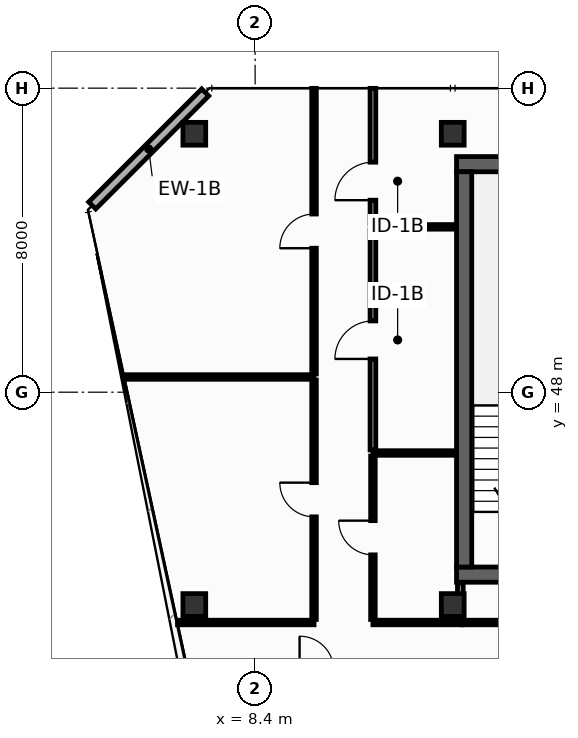
"""IFC4 building model, lengths in metres.
Left out: names, types, materials, properties, quantities, classifications, styles, units other than length and angle.
Written with IfcOpenShell. Run it as: python <this file> out.ifc"""

import sys

from ifc_helpers import new_model, si_unit, direction, frame, frame_2d, origin, origin_2d, place, context, subcontext, project, spatial, rectangle, hollow_rectangle, extrude, element, fill, save


model = new_model("IFC4")
c1 = context("Model", 3, precision=1e-05, world=origin(), true_north=direction((0.0, 1.0)))
c2 = subcontext(c1, "Body", "Model", "MODEL_VIEW")
j1 = project(units=[si_unit("LENGTHUNIT", "METRE"), si_unit("PLANEANGLEUNIT", "RADIAN")], contexts=[c1])
p1 = place(None, origin())
s1 = spatial("IfcSite", under=j1, at=p1, CompositionType="ELEMENT")
p2 = place(p1, origin())
s2 = spatial("IfcBuilding", under=s1, at=p2, CompositionType="ELEMENT")
p3 = place(p2, frame((0.0, 0.0, 310.4)))
s3 = spatial("IfcBuildingStorey", under=s2, at=p3, CompositionType="ELEMENT", Elevation=310.4)
p4 = place(p3, frame((13.7, 43.2, 0.0), z_axis=(0.0, 0.0, 1.0), x_axis=(1.0, 0.0, 0.0)))
e1 = element("IfcWall", 1, at=p4, inside=s3, PredefinedType="SHEAR", context=c2, shape_type="SweptSolid", body=[
    extrude(rectangle(XDim=32.5, YDim=0.4, at=frame_2d((16.25, 0.0))), origin(), (0.0, 0.0, 1.0), 3.55),
])
p5 = place(p4, frame((5.4, 0.0, 0.0)))
e2 = element("IfcOpeningElement", 2, at=p5, cuts=e1, PredefinedType="OPENING", context=c2, shape_type="SweptSolid", body=[
    extrude(rectangle(XDim=1.1, YDim=2.15, at=frame_2d((0.55, 1.075))), frame((0.0, 0.21, 0.0), z_axis=(0.0, -1.0, 0.0), x_axis=(1.0, 0.0, 0.0)), (0.0, 0.0, 1.0), 0.42),
])
p6 = place(p4, frame((25.6, 0.0, 0.0)))
e3 = element("IfcOpeningElement", 3, at=p6, cuts=e1, PredefinedType="OPENING", context=c2, shape_type="SweptSolid", body=[
    extrude(rectangle(XDim=1.1, YDim=2.15, at=frame_2d((0.55, 1.075))), frame((0.0, 0.21, 0.0), z_axis=(0.0, -1.0, 0.0), x_axis=(1.0, 0.0, 0.0)), (0.0, 0.0, 1.0), 0.42),
])
p7 = place(p3, frame((13.7, 54.0, 0.0), z_axis=(0.0, 0.0, 1.0), x_axis=(1.0, 0.0, 0.0)))
e4 = element("IfcWall", 4, at=p7, inside=s3, PredefinedType="SHEAR", context=c2, shape_type="SweptSolid", body=[
    extrude(rectangle(XDim=32.5, YDim=0.4, at=frame_2d((16.25, 0.0))), origin(), (0.0, 0.0, 1.0), 3.55),
])
p8 = place(p3, frame((13.9, 43.4, 0.0), z_axis=(0.0, 0.0, 1.0), x_axis=(0.0, 1.0, 0.0)))
e5 = element("IfcWall", 5, at=p8, inside=s3, PredefinedType="SHEAR", context=c2, shape_type="SweptSolid", body=[
    extrude(rectangle(XDim=10.4, YDim=0.4, at=frame_2d((5.2, 0.0))), origin(), (0.0, 0.0, 1.0), 3.55),
])
for number, where, z_axis, x_axis in (
    (6, (6.8, 54.8, 0.0), (0.0, 0.0, 1.0), (1.0, 0.0, 0.0)),
    (7, (13.6, 54.8, 0.0), (0.0, 0.0, 1.0), (1.0, 0.0, 0.0)),
    (8, (6.8, 42.4, 0.0), (0.0, 0.0, 1.0), (1.0, 0.0, 0.0)),
    (9, (13.6, 42.4, 0.0), (0.0, 0.0, 1.0), (1.0, 0.0, 0.0)),
):
    element("IfcColumn", number, at=place(p3, frame(where, z_axis=z_axis, x_axis=x_axis)), inside=s3, PredefinedType="COLUMN", context=c2, shape_type="SweptSolid", body=[
        extrude(hollow_rectangle(XDim=0.6, YDim=0.6, WallThickness=0.028, at=origin_2d()), origin(), (0.0, 0.0, 1.0), 3.8),
    ])
p9 = place(p3, frame((7.087, 55.887, 0.0), z_axis=(0.0, 0.0, 1.0), x_axis=(-0.707106781187, -0.707106781187, 0.0)))
e10 = element("IfcWall", 10, at=p9, inside=s3, PredefinedType="STANDARD", context=c2, shape_type="SweptSolid", body=[
    extrude(rectangle(XDim=4.206, YDim=0.26, at=frame_2d((2.103, 0.0))), origin(), (0.0, 0.0, 1.0), 3.55),
])
p10 = place(p3, frame((6.358, 41.94, 0.0), z_axis=(0.0, 0.0, 1.0), x_axis=(1.0, 0.0, 0.0)))
e11 = element("IfcWall", 11, at=p10, inside=s3, PredefinedType="PARTITIONING", context=c2, shape_type="SweptSolid", body=[
    extrude(rectangle(XDim=3.592, YDim=0.12, at=frame_2d((1.796, 0.0))), origin(), (0.0, 0.0, 1.0), 3.085),
])
p11 = place(p3, frame((11.5, 41.94, 0.0), z_axis=(0.0, 0.0, 1.0), x_axis=(1.0, 0.0, 0.0)))
e12 = element("IfcWall", 12, at=p11, inside=s3, PredefinedType="PARTITIONING", context=c2, shape_type="SweptSolid", body=[
    extrude(rectangle(XDim=2.35, YDim=0.12, at=frame_2d((1.175, 0.0))), origin(), (0.0, 0.0, 1.0), 3.55),
])
p12 = place(p3, frame((11.5, 52.35, 0.0), z_axis=(0.0, 0.0, 1.0), x_axis=(1.0, 0.0, 0.0)))
e13 = element("IfcWall", 13, at=p12, inside=s3, PredefinedType="PARTITIONING", context=c2, shape_type="SweptSolid", body=[
    extrude(rectangle(XDim=2.18, YDim=0.12, at=frame_2d((1.09, 0.0))), origin(), (0.0, 0.0, 1.0), 3.55),
])
p13 = place(p3, frame((11.5, 52.43, 0.0), z_axis=(0.0, 0.0, 1.0), x_axis=(0.0, 1.0, 0.0)))
e14 = element("IfcWall", 14, at=p13, inside=s3, PredefinedType="PARTITIONING", context=c2, shape_type="SweptSolid", body=[
    extrude(rectangle(XDim=3.565, YDim=0.15, at=frame_2d((1.783, 0.0))), origin(), (0.0, 0.0, 1.0), 2.935),
])
p14 = place(p13, frame((0.622, 0.0, 0.0)))
e15 = element("IfcOpeningElement", 15, at=p14, cuts=e14, PredefinedType="OPENING", context=c2, shape_type="SweptSolid", body=[
    extrude(rectangle(XDim=1.0, YDim=2.15, at=frame_2d((0.5, 1.075))), frame((0.0, 0.085, 0.0), z_axis=(0.0, -1.0, 0.0), x_axis=(1.0, 0.0, 0.0)), (0.0, 0.0, 1.0), 0.17),
])
p15 = place(p3, frame((4.958, 48.4, 0.0), z_axis=(0.0, 0.0, 1.0), x_axis=(1.0, 0.0, 0.0)))
e16 = element("IfcWall", 16, at=p15, inside=s3, PredefinedType="PARTITIONING", context=c2, shape_type="SweptSolid", body=[
    extrude(rectangle(XDim=4.991, YDim=0.12, at=frame_2d((2.496, 0.0))), origin(), (0.0, 0.0, 1.0), 2.947),
])
p16 = place(p3, frame((9.95, 42.02, 0.0), z_axis=(0.0, 0.0, 1.0), x_axis=(0.0, 1.0, 0.0)))
e17 = element("IfcWall", 17, at=p16, inside=s3, PredefinedType="PARTITIONING", context=c2, shape_type="SweptSolid", body=[
    extrude(rectangle(XDim=6.3, YDim=0.12, at=frame_2d((3.15, 0.0))), origin(), (0.0, 0.0, 1.0), 2.947),
])
p17 = place(p16, frame((2.7, 0.0, 0.0)))
e18 = element("IfcOpeningElement", 18, at=p17, cuts=e17, PredefinedType="OPENING", context=c2, shape_type="SweptSolid", body=[
    extrude(rectangle(XDim=0.9, YDim=2.1, at=frame_2d((0.45, 1.05))), frame((0.0, 0.07, 0.0), z_axis=(0.0, -1.0, 0.0), x_axis=(1.0, 0.0, 0.0)), (0.0, 0.0, 1.0), 0.14),
])
p18 = place(p3, frame((9.95, 48.48, 0.0), z_axis=(0.0, 0.0, 1.0), x_axis=(0.0, 1.0, 0.0)))
e19 = element("IfcWall", 19, at=p18, inside=s3, PredefinedType="PARTITIONING", context=c2, shape_type="SweptSolid", body=[
    extrude(rectangle(XDim=7.515, YDim=0.12, at=frame_2d((3.758, 0.0))), origin(), (0.0, 0.0, 1.0), 2.935),
])
p19 = place(p18, frame((3.308, 0.0, 0.0)))
e20 = element("IfcOpeningElement", 20, at=p19, cuts=e19, PredefinedType="OPENING", context=c2, shape_type="SweptSolid", body=[
    extrude(rectangle(XDim=0.9, YDim=2.1, at=frame_2d((0.45, 1.05))), frame((0.0, 0.07, 0.0), z_axis=(0.0, -1.0, 0.0), x_axis=(1.0, 0.0, 0.0)), (0.0, 0.0, 1.0), 0.14),
])
p20 = place(p3, frame((11.5, 46.4, 0.0), z_axis=(0.0, 0.0, 1.0), x_axis=(1.0, 0.0, 0.0)))
e21 = element("IfcWall", 21, at=p20, inside=s3, PredefinedType="PARTITIONING", context=c2, shape_type="SweptSolid", body=[
    extrude(rectangle(XDim=2.18, YDim=0.12, at=frame_2d((1.09, 0.0))), origin(), (0.0, 0.0, 1.0), 3.55),
])
p21 = place(p3, frame((11.5, 42.02, 0.0), z_axis=(0.0, 0.0, 1.0), x_axis=(0.0, 1.0, 0.0)))
e22 = element("IfcWall", 22, at=p21, inside=s3, PredefinedType="PARTITIONING", context=c2, shape_type="SweptSolid", body=[
    extrude(rectangle(XDim=4.3, YDim=0.12, at=frame_2d((2.15, 0.0))), origin(), (0.0, 0.0, 1.0), 2.947),
])
p22 = place(p21, frame((1.7, 0.0, 0.0)))
e23 = element("IfcOpeningElement", 23, at=p22, cuts=e22, PredefinedType="OPENING", context=c2, shape_type="SweptSolid", body=[
    extrude(rectangle(XDim=0.9, YDim=2.1, at=frame_2d((0.45, 1.05))), frame((0.0, 0.07, 0.0), z_axis=(0.0, -1.0, 0.0), x_axis=(1.0, 0.0, 0.0)), (0.0, 0.0, 1.0), 0.14),
])
p23 = place(p3, frame((11.5, 46.48, 0.0), z_axis=(0.0, 0.0, 1.0), x_axis=(0.0, 1.0, 0.0)))
e24 = element("IfcWall", 24, at=p23, inside=s3, PredefinedType="PARTITIONING", context=c2, shape_type="SweptSolid", body=[
    extrude(rectangle(XDim=5.79, YDim=0.15, at=frame_2d((2.895, 0.0))), origin(), (0.0, 0.0, 1.0), 3.55),
])
p24 = place(p23, frame((2.395, 0.0, 0.0)))
e25 = element("IfcOpeningElement", 25, at=p24, cuts=e24, PredefinedType="OPENING", context=c2, shape_type="SweptSolid", body=[
    extrude(rectangle(XDim=1.0, YDim=2.15, at=frame_2d((0.5, 1.075))), frame((0.0, 0.085, 0.0), z_axis=(0.0, -1.0, 0.0), x_axis=(1.0, 0.0, 0.0)), (0.0, 0.0, 1.0), 0.17),
])
p25 = place(p3, frame((13.8, 42.02, 0.0), z_axis=(0.0, 0.0, 1.0), x_axis=(0.0, 1.0, 0.0)))
e26 = element("IfcWall", 26, at=p25, inside=s3, PredefinedType="PARTITIONING", context=c2, shape_type="SweptSolid", body=[
    extrude(rectangle(XDim=0.96, YDim=0.15, at=frame_2d((0.48, 0.0))), origin(), (0.0, 0.0, 1.0), 3.55),
])
p26 = place(p3, frame((13.85, 41.94, 0.0), z_axis=(0.0, 0.0, 1.0), x_axis=(1.0, 0.0, 0.0)))
e27 = element("IfcWall", 27, at=p26, inside=s3, PredefinedType="PARTITIONING", context=c2, shape_type="SweptSolid", body=[
    extrude(rectangle(XDim=4.655, YDim=0.12, at=frame_2d((2.327, 0.0))), origin(), (0.0, 0.0, 1.0), 3.55),
])
p27 = place(p26, frame((1.877, 0.0, 0.0)))
e28 = element("IfcOpeningElement", 28, at=p27, cuts=e27, PredefinedType="OPENING", context=c2, shape_type="SweptSolid", body=[
    extrude(rectangle(XDim=0.9, YDim=2.1, at=frame_2d((0.45, 1.05))), frame((0.0, 0.07, 0.0), z_axis=(0.0, -1.0, 0.0), x_axis=(1.0, 0.0, 0.0)), (0.0, 0.0, 1.0), 0.14),
])
p28 = place(p14, origin())
e29 = element("IfcDoor", 29, at=p28, inside=s3, OperationType="SINGLE_SWING_LEFT", PredefinedType="DOOR", context=c2, shape_type="SweptSolid", body=[
    extrude(rectangle(XDim=1.0, YDim=2.15, at=frame_2d((0.5, 1.075))), frame((0.0, 0.025, 0.0), z_axis=(0.0, -1.0, 0.0), x_axis=(1.0, 0.0, 0.0)), (0.0, 0.0, 1.0), 0.05),
])
fill(e15, e29)
p29 = place(p17, origin())
e30 = element("IfcDoor", 30, at=p29, inside=s3, OperationType="SINGLE_SWING_RIGHT", PredefinedType="DOOR", context=c2, shape_type="SweptSolid", body=[
    extrude(rectangle(XDim=0.9, YDim=2.1, at=frame_2d((0.45, 1.05))), frame((0.0, 0.025, 0.0), z_axis=(0.0, -1.0, 0.0), x_axis=(1.0, 0.0, 0.0)), (0.0, 0.0, 1.0), 0.05),
])
fill(e18, e30)
p30 = place(p19, origin())
e31 = element("IfcDoor", 31, at=p30, inside=s3, OperationType="SINGLE_SWING_LEFT", PredefinedType="DOOR", context=c2, shape_type="SweptSolid", body=[
    extrude(rectangle(XDim=0.9, YDim=2.1, at=frame_2d((0.45, 1.05))), frame((0.0, 0.025, 0.0), z_axis=(0.0, -1.0, 0.0), x_axis=(1.0, 0.0, 0.0)), (0.0, 0.0, 1.0), 0.05),
])
fill(e20, e31)
p31 = place(p22, origin())
e32 = element("IfcDoor", 32, at=p31, inside=s3, OperationType="SINGLE_SWING_RIGHT", PredefinedType="DOOR", context=c2, shape_type="SweptSolid", body=[
    extrude(rectangle(XDim=0.9, YDim=2.1, at=frame_2d((0.45, 1.05))), frame((0.0, 0.025, 0.0), z_axis=(0.0, -1.0, 0.0), x_axis=(1.0, 0.0, 0.0)), (0.0, 0.0, 1.0), 0.05),
])
fill(e23, e32)
p32 = place(p24, origin())
e33 = element("IfcDoor", 33, at=p32, inside=s3, OperationType="SINGLE_SWING_LEFT", PredefinedType="DOOR", context=c2, shape_type="SweptSolid", body=[
    extrude(rectangle(XDim=1.0, YDim=2.15, at=frame_2d((0.5, 1.075))), frame((0.0, 0.025, 0.0), z_axis=(0.0, -1.0, 0.0), x_axis=(1.0, 0.0, 0.0)), (0.0, 0.0, 1.0), 0.05),
])
fill(e25, e33)
save(model, sys.argv[1])
